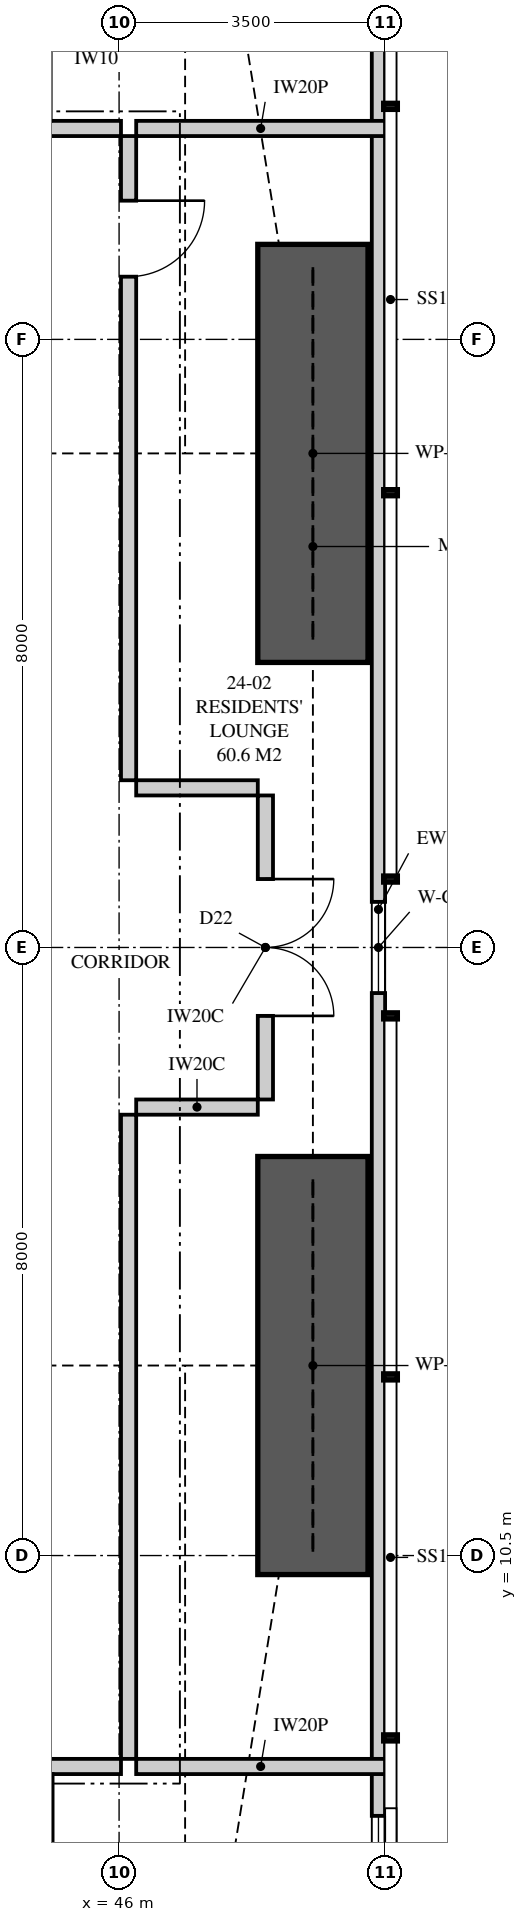
"""IFC4 building model, lengths in metres.
Left out: names, types, materials, properties, quantities, classifications, styles, units other than length and angle.
Written with IfcOpenShell. Run it as: python <this file> out.ifc"""

import sys

from ifc_helpers import new_model, si_unit, direction, frame, frame_2d, origin, place, context, subcontext, project, spatial, polyline, rectangle, outline, extrude, element, fill, save


model = new_model("IFC4")
c1 = context("Model", 3, precision=1e-05, world=origin(), true_north=direction((0.0, 1.0)))
c2 = subcontext(c1, "Body", "Model", "MODEL_VIEW")
j1 = project(units=[si_unit("LENGTHUNIT", "METRE"), si_unit("PLANEANGLEUNIT", "RADIAN")], contexts=[c1])
p1 = place(None, origin())
s1 = spatial("IfcSite", under=j1, at=p1, CompositionType="ELEMENT")
p2 = place(p1, origin())
s2 = spatial("IfcBuilding", under=s1, at=p2, CompositionType="ELEMENT")
p3 = place(p2, frame((0.0, 0.0, 91.45)))
s3 = spatial("IfcBuildingStorey", under=s2, at=p3, CompositionType="ELEMENT", Elevation=91.45)
p4 = place(p3, frame((49.413, 3.051, 0.0), z_axis=(0.0, 0.0, 1.0), x_axis=(0.0, 1.0, 0.0)))
e1 = element("IfcWall", 1, at=p4, inside=s3, PredefinedType="SOLIDWALL", context=c2, shape_type="SweptSolid", body=[
    extrude(outline(polyline([(0.0, 0.0), (31.897, 0.0), (31.897, 3.11), (22.167, 3.11), (22.167, 2.15), (22.074, 2.15), (22.074, 3.11), (21.949, 3.11), (21.949, 2.15), (9.949, 2.15), (9.949, 3.11), (9.823, 3.11), (9.823, 2.15), (9.73, 2.15), (9.73, 3.11), (0.0, 3.11), (0.0, 0.0)])), frame((0.0, 0.087, 0.0), z_axis=(0.0, -1.0, 0.0), x_axis=(1.0, 0.0, 0.0)), (0.0, 0.0, 1.0), 0.175),
])
p5 = place(p4, frame((2.224, 0.0, 0.4)))
e2 = element("IfcOpeningElement", 2, at=p5, cuts=e1, PredefinedType="OPENING", context=c2, shape_type="SweptSolid", body=[
    extrude(rectangle(XDim=1.8, YDim=1.7, at=frame_2d((0.9, 0.85))), frame((0.0, 0.097, 0.0), z_axis=(0.0, -1.0, 0.0), x_axis=(1.0, 0.0, 0.0)), (0.0, 0.0, 1.0), 0.195),
])
p6 = place(p4, frame((14.849, 0.0, 0.4)))
e3 = element("IfcOpeningElement", 3, at=p6, cuts=e1, PredefinedType="OPENING", context=c2, shape_type="SweptSolid", body=[
    extrude(rectangle(XDim=1.2, YDim=1.7, at=frame_2d((0.6, 0.85))), frame((0.0, 0.097, 0.0), z_axis=(0.0, -1.0, 0.0), x_axis=(1.0, 0.0, 0.0)), (0.0, 0.0, 1.0), 0.195),
])
p7 = place(p4, frame((27.373, 0.0, 0.4)))
e4 = element("IfcOpeningElement", 4, at=p7, cuts=e1, PredefinedType="OPENING", context=c2, shape_type="SweptSolid", body=[
    extrude(rectangle(XDim=1.8, YDim=1.7, at=frame_2d((0.9, 0.85))), frame((0.0, 0.097, 0.0), z_axis=(0.0, -1.0, 0.0), x_axis=(1.0, 0.0, 0.0)), (0.0, 0.0, 1.0), 0.195),
])
p8 = place(p3, frame((37.925, 7.725, 0.0), z_axis=(0.0, 0.0, 1.0), x_axis=(1.0, 0.0, 0.0)))
e5 = element("IfcWall", 5, at=p8, inside=s3, PredefinedType="PARTITIONING", context=c2, shape_type="SweptSolid", body=[
    extrude(outline(polyline([(0.0, 0.0), (8.1, 0.0), (8.1, 3.11), (1.037, 3.11), (1.037, 2.541), (0.363, 2.541), (0.363, 3.11), (0.0, 3.11), (0.0, 0.0)])), frame((0.0, 0.1, 0.0), z_axis=(0.0, -1.0, 0.0), x_axis=(1.0, 0.0, 0.0)), (0.0, 0.0, 1.0), 0.2),
])
p9 = place(p8, frame((2.4, 0.0, 0.0)))
e6 = element("IfcOpeningElement", 6, at=p9, cuts=e5, PredefinedType="OPENING", context=c2, shape_type="SweptSolid", body=[
    extrude(rectangle(XDim=1.05, YDim=2.2, at=frame_2d((0.525, 1.1))), frame((0.0, 0.11, 0.0), z_axis=(0.0, -1.0, 0.0), x_axis=(1.0, 0.0, 0.0)), (0.0, 0.0, 1.0), 0.22),
])
p10 = place(p3, frame((46.225, 7.725, 0.0), z_axis=(0.0, 0.0, 1.0), x_axis=(1.0, 0.0, 0.0)))
e7 = element("IfcWall", 7, at=p10, inside=s3, PredefinedType="PARTITIONING", context=c2, shape_type="SweptSolid", body=[
    extrude(outline(polyline([(0.0, 0.0), (3.275, 0.0), (3.275, 3.11), (2.392, 3.11), (2.392, 2.15), (0.643, 2.15), (0.643, 2.541), (0.306, 2.541), (0.306, 3.11), (0.0, 3.11), (0.0, 0.0)])), frame((0.0, 0.1, 0.0), z_axis=(0.0, -1.0, 0.0), x_axis=(1.0, 0.0, 0.0)), (0.0, 0.0, 1.0), 0.2),
])
p11 = place(p3, frame((37.6, 29.275, 0.0), z_axis=(0.0, 0.0, 1.0), x_axis=(1.0, 0.0, 0.0)))
e8 = element("IfcWall", 8, at=p11, inside=s3, PredefinedType="PARTITIONING", context=c2, shape_type="SweptSolid", body=[
    extrude(outline(polyline([(0.0, 0.0), (8.425, 0.0), (8.425, 3.11), (1.362, 3.11), (1.362, 2.541), (0.688, 2.541), (0.688, 3.11), (0.0, 3.11), (0.0, 0.0)])), frame((0.0, 0.1, 0.0), z_axis=(0.0, -1.0, 0.0), x_axis=(1.0, 0.0, 0.0)), (0.0, 0.0, 1.0), 0.2),
])
p12 = place(p11, frame((3.8, 0.0, 0.0)))
e9 = element("IfcOpeningElement", 9, at=p12, cuts=e8, PredefinedType="OPENING", context=c2, shape_type="SweptSolid", body=[
    extrude(rectangle(XDim=1.05, YDim=2.2, at=frame_2d((0.525, 1.1))), frame((0.0, 0.11, 0.0), z_axis=(0.0, -1.0, 0.0), x_axis=(1.0, 0.0, 0.0)), (0.0, 0.0, 1.0), 0.22),
])
p13 = place(p3, frame((46.225, 29.275, 0.0), z_axis=(0.0, 0.0, 1.0), x_axis=(1.0, 0.0, 0.0)))
e10 = element("IfcWall", 10, at=p13, inside=s3, PredefinedType="PARTITIONING", context=c2, shape_type="SweptSolid", body=[
    extrude(outline(polyline([(0.0, 0.0), (3.275, 0.0), (3.275, 3.11), (2.554, 3.11), (2.554, 2.15), (0.805, 2.15), (0.805, 2.541), (0.306, 2.541), (0.306, 3.11), (0.0, 3.11), (0.0, 0.0)])), frame((0.0, 0.1, 0.0), z_axis=(0.0, -1.0, 0.0), x_axis=(1.0, 0.0, 0.0)), (0.0, 0.0, 1.0), 0.2),
])
p14 = place(p3, frame((46.125, 7.825, 0.0), z_axis=(0.0, 0.0, 1.0), x_axis=(0.0, 1.0, 0.0)))
e11 = element("IfcWall", 11, at=p14, inside=s3, PredefinedType="PARTITIONING", context=c2, shape_type="SweptSolid", body=[
    extrude(outline(polyline([(0.0, 0.0), (8.475, 0.0), (8.475, 3.11), (5.512, 3.11), (5.512, 2.541), (4.838, 2.541), (4.838, 3.11), (0.0, 3.11), (0.0, 0.0)])), frame((0.0, 0.1, 0.0), z_axis=(0.0, -1.0, 0.0), x_axis=(1.0, 0.0, 0.0)), (0.0, 0.0, 1.0), 0.2),
])
p15 = place(p3, frame((46.125, 20.7, 0.0), z_axis=(0.0, 0.0, 1.0), x_axis=(0.0, 1.0, 0.0)))
e12 = element("IfcWall", 12, at=p15, inside=s3, PredefinedType="PARTITIONING", context=c2, shape_type="SweptSolid", body=[
    extrude(outline(polyline([(0.0, 0.0), (8.475, 0.0), (8.475, 3.11), (4.637, 3.11), (4.637, 2.541), (3.963, 2.541), (3.963, 3.11), (0.0, 3.11), (0.0, 0.0)])), frame((0.0, 0.1, 0.0), z_axis=(0.0, -1.0, 0.0), x_axis=(1.0, 0.0, 0.0)), (0.0, 0.0, 1.0), 0.2),
])
p16 = place(p15, frame((6.625, 0.0, 0.0)))
e13 = element("IfcOpeningElement", 13, at=p16, cuts=e12, PredefinedType="OPENING", context=c2, shape_type="SweptSolid", body=[
    extrude(rectangle(XDim=1.0, YDim=2.1, at=frame_2d((0.5, 1.05))), frame((0.0, 0.11, 0.0), z_axis=(0.0, -1.0, 0.0), x_axis=(1.0, 0.0, 0.0)), (0.0, 0.0, 1.0), 0.22),
])
p17 = place(p3, frame((47.925, 16.5, 0.0), z_axis=(0.0, 0.0, 1.0), x_axis=(0.0, 1.0, 0.0)))
e14 = element("IfcWall", 14, at=p17, inside=s3, PredefinedType="PARTITIONING", context=c2, shape_type="SweptSolid", body=[
    extrude(outline(polyline([(0.0, 0.0), (4.0, 0.0), (4.0, 3.11), (4.0, 2.15), (0.0, 2.15), (0.0, 3.11), (0.0, 0.0)])), frame((0.0, 0.1, 0.0), z_axis=(0.0, -1.0, 0.0), x_axis=(1.0, 0.0, 0.0)), (0.0, 0.0, 1.0), 0.2),
])
p18 = place(p17, frame((1.1, 0.0, 0.0)))
e15 = element("IfcOpeningElement", 15, at=p18, cuts=e14, PredefinedType="OPENING", context=c2, shape_type="SweptSolid", body=[
    extrude(rectangle(XDim=1.8, YDim=2.1, at=frame_2d((0.9, 1.05))), frame((0.0, 0.11, 0.0), z_axis=(0.0, -1.0, 0.0), x_axis=(1.0, 0.0, 0.0)), (0.0, 0.0, 1.0), 0.22),
])
for number, where, z_axis, x_axis in (
    (16, (46.225, 16.4, 0.0), (0.0, 0.0, 1.0), (1.0, 0.0, 0.0)),
    (17, (46.225, 20.6, 0.0), (0.0, 0.0, 1.0), (1.0, 0.0, 0.0)),
):
    element("IfcWall", number, at=place(p3, frame(where, z_axis=z_axis, x_axis=x_axis)), inside=s3, PredefinedType="PARTITIONING", context=c2, shape_type="SweptSolid", body=[
        extrude(outline(polyline([(0.0, 0.0), (1.6, 0.0), (1.6, 3.11), (1.6, 2.15), (1.415, 2.15), (1.415, 3.11), (0.0, 3.11), (0.0, 0.0)])), frame((0.0, 0.1, 0.0), z_axis=(0.0, -1.0, 0.0), x_axis=(1.0, 0.0, 0.0)), (0.0, 0.0, 1.0), 0.2),
    ])
for number, where, z_axis, x_axis in (
    (18, (48.55, 10.25, 0.0), (0.0, 0.0, 1.0), (0.0, 1.0, 0.0)),
    (19, (48.55, 22.25, 0.0), (0.0, 0.0, 1.0), (0.0, 1.0, 0.0)),
):
    element("IfcWall", number, at=place(p3, frame(where, z_axis=z_axis, x_axis=x_axis)), inside=s3, PredefinedType="SHEAR", context=c2, shape_type="SweptSolid", body=[
        extrude(rectangle(XDim=5.5, YDim=1.45, at=frame_2d((2.75, 0.0))), origin(), (0.0, 0.0, 1.0), 3.35),
    ])
p19 = place(p5, origin())
e20 = element("IfcWindow", 20, at=p19, inside=s3, PartitioningType="SINGLE_PANEL", PredefinedType="WINDOW", context=c2, shape_type="SweptSolid", body=[
    extrude(rectangle(XDim=1.8, YDim=1.7, at=frame_2d((0.9, 0.85))), frame((0.0, 0.03, 0.0), z_axis=(0.0, -1.0, 0.0), x_axis=(1.0, 0.0, 0.0)), (0.0, 0.0, 1.0), 0.06),
])
fill(e2, e20)
p20 = place(p6, origin())
e21 = element("IfcWindow", 21, at=p20, inside=s3, PartitioningType="SINGLE_PANEL", PredefinedType="WINDOW", context=c2, shape_type="SweptSolid", body=[
    extrude(rectangle(XDim=1.2, YDim=1.7, at=frame_2d((0.6, 0.85))), frame((0.0, 0.03, 0.0), z_axis=(0.0, -1.0, 0.0), x_axis=(1.0, 0.0, 0.0)), (0.0, 0.0, 1.0), 0.06),
])
fill(e3, e21)
p21 = place(p18, frame((1.8, 0.0, 0.0), z_axis=(0.0, 0.0, 1.0), x_axis=(-1.0, 0.0, 0.0)))
e22 = element("IfcDoor", 22, at=p21, inside=s3, OperationType="DOUBLE_DOOR_SINGLE_SWING", PredefinedType="DOOR", context=c2, shape_type="SweptSolid", body=[
    extrude(rectangle(XDim=1.8, YDim=2.1, at=frame_2d((0.9, 1.05))), frame((0.0, 0.025, 0.0), z_axis=(0.0, -1.0, 0.0), x_axis=(1.0, 0.0, 0.0)), (0.0, 0.0, 1.0), 0.05),
])
fill(e15, e22)
p22 = place(p16, frame((1.0, 0.0, 0.0), z_axis=(0.0, 0.0, 1.0), x_axis=(-1.0, 0.0, 0.0)))
e23 = element("IfcDoor", 23, at=p22, inside=s3, OperationType="SINGLE_SWING_LEFT", PredefinedType="DOOR", context=c2, shape_type="SweptSolid", body=[
    extrude(rectangle(XDim=1.0, YDim=2.1, at=frame_2d((0.5, 1.05))), frame((0.0, 0.025, 0.0), z_axis=(0.0, -1.0, 0.0), x_axis=(1.0, 0.0, 0.0)), (0.0, 0.0, 1.0), 0.05),
])
fill(e13, e23)
save(model, sys.argv[1])
